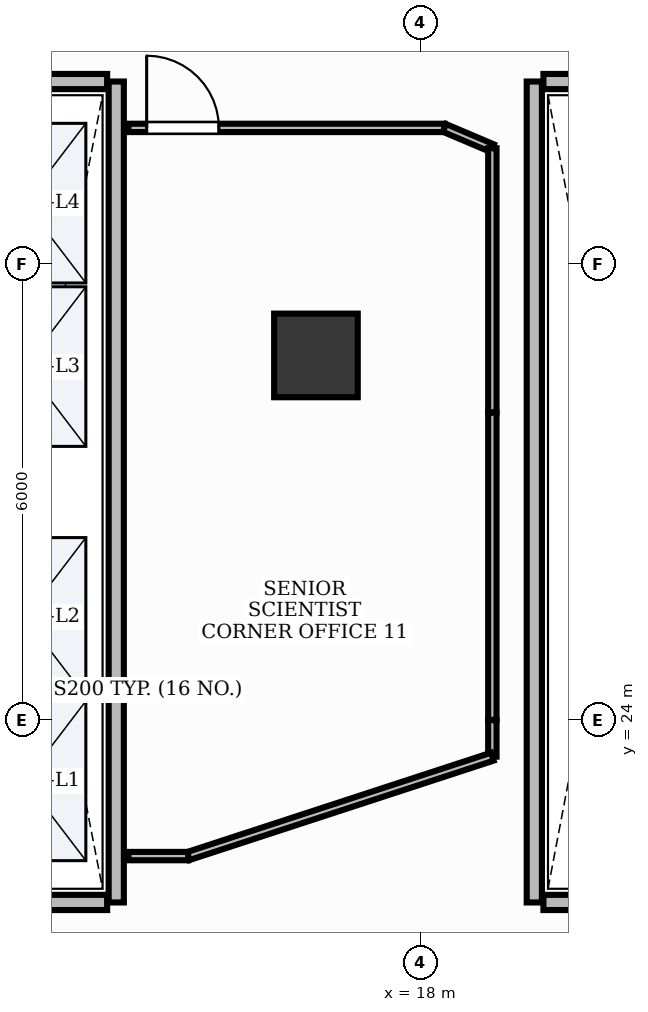
"""IFC4 building model, lengths in metres.
Left out: names, types, materials, properties, quantities, classifications, styles, units other than length and angle.
Written with IfcOpenShell. Run it as: python <this file> out.ifc"""

import sys

from ifc_helpers import new_model, si_unit, direction, frame, frame_2d, origin, origin_2d, place, context, subcontext, project, spatial, rectangle, extrude, element, fill, save


model = new_model("IFC4")
c1 = context("Model", 3, precision=1e-05, world=origin(), true_north=direction((0.0, 1.0)))
c2 = subcontext(c1, "Body", "Model", "MODEL_VIEW")
j1 = project(units=[si_unit("LENGTHUNIT", "METRE"), si_unit("PLANEANGLEUNIT", "RADIAN")], contexts=[c1])
p1 = place(None, origin())
s1 = spatial("IfcSite", under=j1, at=p1, CompositionType="ELEMENT")
p2 = place(p1, origin())
s2 = spatial("IfcBuilding", under=s1, at=p2, CompositionType="ELEMENT")
p3 = place(p2, frame((0.0, 0.0, 98.4)))
s3 = spatial("IfcBuildingStorey", under=s2, at=p3, CompositionType="ELEMENT", Elevation=98.4)
p4 = place(p3, frame((16.627, 28.797, -0.0), z_axis=(0.0, 0.0, 1.0), x_axis=(1.0, 0.0, 0.0)))
e1 = element("IfcColumn", 1, at=p4, inside=s3, PredefinedType="COLUMN", context=c2, shape_type="SweptSolid", body=[
    extrude(rectangle(XDim=1.1, YDim=1.1, at=origin_2d()), origin(), (0.0, 0.0, 1.0), 3.901),
])
p5 = place(p3, frame((14.0, 21.6, 0.0), z_axis=(0.0, 0.0, 1.0), x_axis=(0.0, 1.0, 0.0)))
e2 = element("IfcWall", 2, at=p5, inside=s3, PredefinedType="PARTITIONING", context=c2, shape_type="SweptSolid", body=[
    extrude(rectangle(XDim=10.8, YDim=0.2, at=frame_2d((5.4, 0.0))), origin(), (0.0, 0.0, 1.0), 2.91),
])
for number, where, z_axis, x_axis in (
    (3, (11.72, 21.6, 0.0), (0.0, 0.0, 1.0), (1.0, 0.0, 0.0)),
    (4, (11.72, 32.4, 0.0), (0.0, 0.0, 1.0), (1.0, 0.0, 0.0)),
):
    element("IfcWall", number, at=place(p3, frame(where, z_axis=z_axis, x_axis=x_axis)), inside=s3, PredefinedType="PARTITIONING", context=c2, shape_type="SweptSolid", body=[
        extrude(rectangle(XDim=2.16, YDim=0.2, at=frame_2d((1.08, 0.0))), origin(), (0.0, 0.0, 1.0), 2.91),
    ])
p6 = place(p3, frame((19.5, 21.6, 0.0), z_axis=(0.0, 0.0, 1.0), x_axis=(0.0, 1.0, 0.0)))
e5 = element("IfcWall", 5, at=p6, inside=s3, PredefinedType="PARTITIONING", context=c2, shape_type="SweptSolid", body=[
    extrude(rectangle(XDim=10.8, YDim=0.2, at=frame_2d((5.4, 0.0))), origin(), (0.0, 0.0, 1.0), 2.91),
])
for number, where, z_axis, x_axis in (
    (6, (19.62, 21.6, 0.0), (0.0, 0.0, 1.0), (1.0, 0.0, 0.0)),
    (7, (19.62, 32.4, 0.0), (0.0, 0.0, 1.0), (1.0, 0.0, 0.0)),
):
    element("IfcWall", number, at=place(p3, frame(where, z_axis=z_axis, x_axis=x_axis)), inside=s3, PredefinedType="PARTITIONING", context=c2, shape_type="SweptSolid", body=[
        extrude(rectangle(XDim=2.11, YDim=0.2, at=frame_2d((1.055, 0.0))), origin(), (0.0, 0.0, 1.0), 2.91),
    ])
p7 = place(p3, frame((14.16, 31.79, 0.0), z_axis=(0.0, 0.0, 1.0), x_axis=(1.0, 0.0, 0.0)))
e8 = element("IfcWall", 8, at=p7, inside=s3, PredefinedType="MOVABLE", context=c2, shape_type="SweptSolid", body=[
    extrude(rectangle(XDim=4.158, YDim=0.11, at=frame_2d((2.079, 0.0))), origin(), (0.0, 0.0, 1.0), 2.91),
])
p8 = place(p7, frame((0.24, 0.0, 0.0)))
e9 = element("IfcOpeningElement", 9, at=p8, cuts=e8, PredefinedType="OPENING", context=c2, shape_type="SweptSolid", body=[
    extrude(rectangle(XDim=0.95, YDim=2.15, at=frame_2d((0.475, 1.075))), frame((0.0, 0.07, 0.0), z_axis=(0.0, -1.0, 0.0), x_axis=(1.0, 0.0, 0.0)), (0.0, 0.0, 1.0), 0.14),
])
p9 = place(p3, frame((18.318, 31.79, 0.0), z_axis=(0.0, 0.0, 1.0), x_axis=(0.920523463189, -0.390687283795, 0.0)))
e10 = element("IfcWall", 10, at=p9, inside=s3, PredefinedType="MOVABLE", context=c2, shape_type="SweptSolid", body=[
    extrude(rectangle(XDim=0.684, YDim=0.11, at=frame_2d((0.342, 0.0))), origin(), (0.0, 0.0, 1.0), 2.91),
])
p10 = place(p3, frame((18.948, 31.522, 0.0), z_axis=(0.0, 0.0, 1.0), x_axis=(0.0, -1.0, 0.0)))
e11 = element("IfcWall", 11, at=p10, inside=s3, PredefinedType="MOVABLE", context=c2, shape_type="SweptSolid", body=[
    extrude(rectangle(XDim=3.475, YDim=0.11, at=frame_2d((1.738, 0.0))), origin(), (0.0, 0.0, 1.0), 2.91),
])
p11 = place(p3, frame((18.948, 28.043, 0.0), z_axis=(0.0, 0.0, 1.0), x_axis=(0.0, -1.0, 0.0)))
e12 = element("IfcWall", 12, at=p11, inside=s3, PredefinedType="MOVABLE", context=c2, shape_type="SweptSolid", body=[
    extrude(rectangle(XDim=4.041, YDim=0.11, at=frame_2d((2.021, 0.0))), origin(), (0.0, 0.0, 1.0), 2.91),
])
p12 = place(p3, frame((18.948, 23.998, 0.0), z_axis=(0.0, 0.0, 1.0), x_axis=(0.0, -1.0, 0.0)))
e13 = element("IfcWall", 13, at=p12, inside=s3, PredefinedType="MOVABLE", context=c2, shape_type="SweptSolid", body=[
    extrude(rectangle(XDim=0.48, YDim=0.11, at=frame_2d((0.24, 0.0))), origin(), (0.0, 0.0, 1.0), 2.91),
])
p13 = place(p3, frame((18.948, 23.518, 0.0), z_axis=(0.0, 0.0, 1.0), x_axis=(-0.950522660163, -0.31065523095, 0.0)))
e14 = element("IfcWall", 14, at=p13, inside=s3, PredefinedType="MOVABLE", context=c2, shape_type="SweptSolid", body=[
    extrude(rectangle(XDim=4.21, YDim=0.11, at=frame_2d((2.105, 0.0))), origin(), (0.0, 0.0, 1.0), 2.91),
])
p14 = place(p3, frame((14.946, 22.21, 0.0), z_axis=(0.0, 0.0, 1.0), x_axis=(-1.0, 0.0, 0.0)))
e15 = element("IfcWall", 15, at=p14, inside=s3, PredefinedType="MOVABLE", context=c2, shape_type="SweptSolid", body=[
    extrude(rectangle(XDim=0.786, YDim=0.11, at=frame_2d((0.393, 0.0))), origin(), (0.0, 0.0, 1.0), 2.91),
])
p15 = place(p8, origin())
e16 = element("IfcDoor", 16, at=p15, inside=s3, OperationType="SINGLE_SWING_LEFT", PredefinedType="DOOR", context=c2, shape_type="SweptSolid", body=[
    extrude(rectangle(XDim=0.95, YDim=2.15, at=frame_2d((0.475, 1.075))), frame((0.0, 0.025, 0.0), z_axis=(0.0, -1.0, 0.0), x_axis=(1.0, 0.0, 0.0)), (0.0, 0.0, 1.0), 0.05),
])
fill(e9, e16)
save(model, sys.argv[1])
